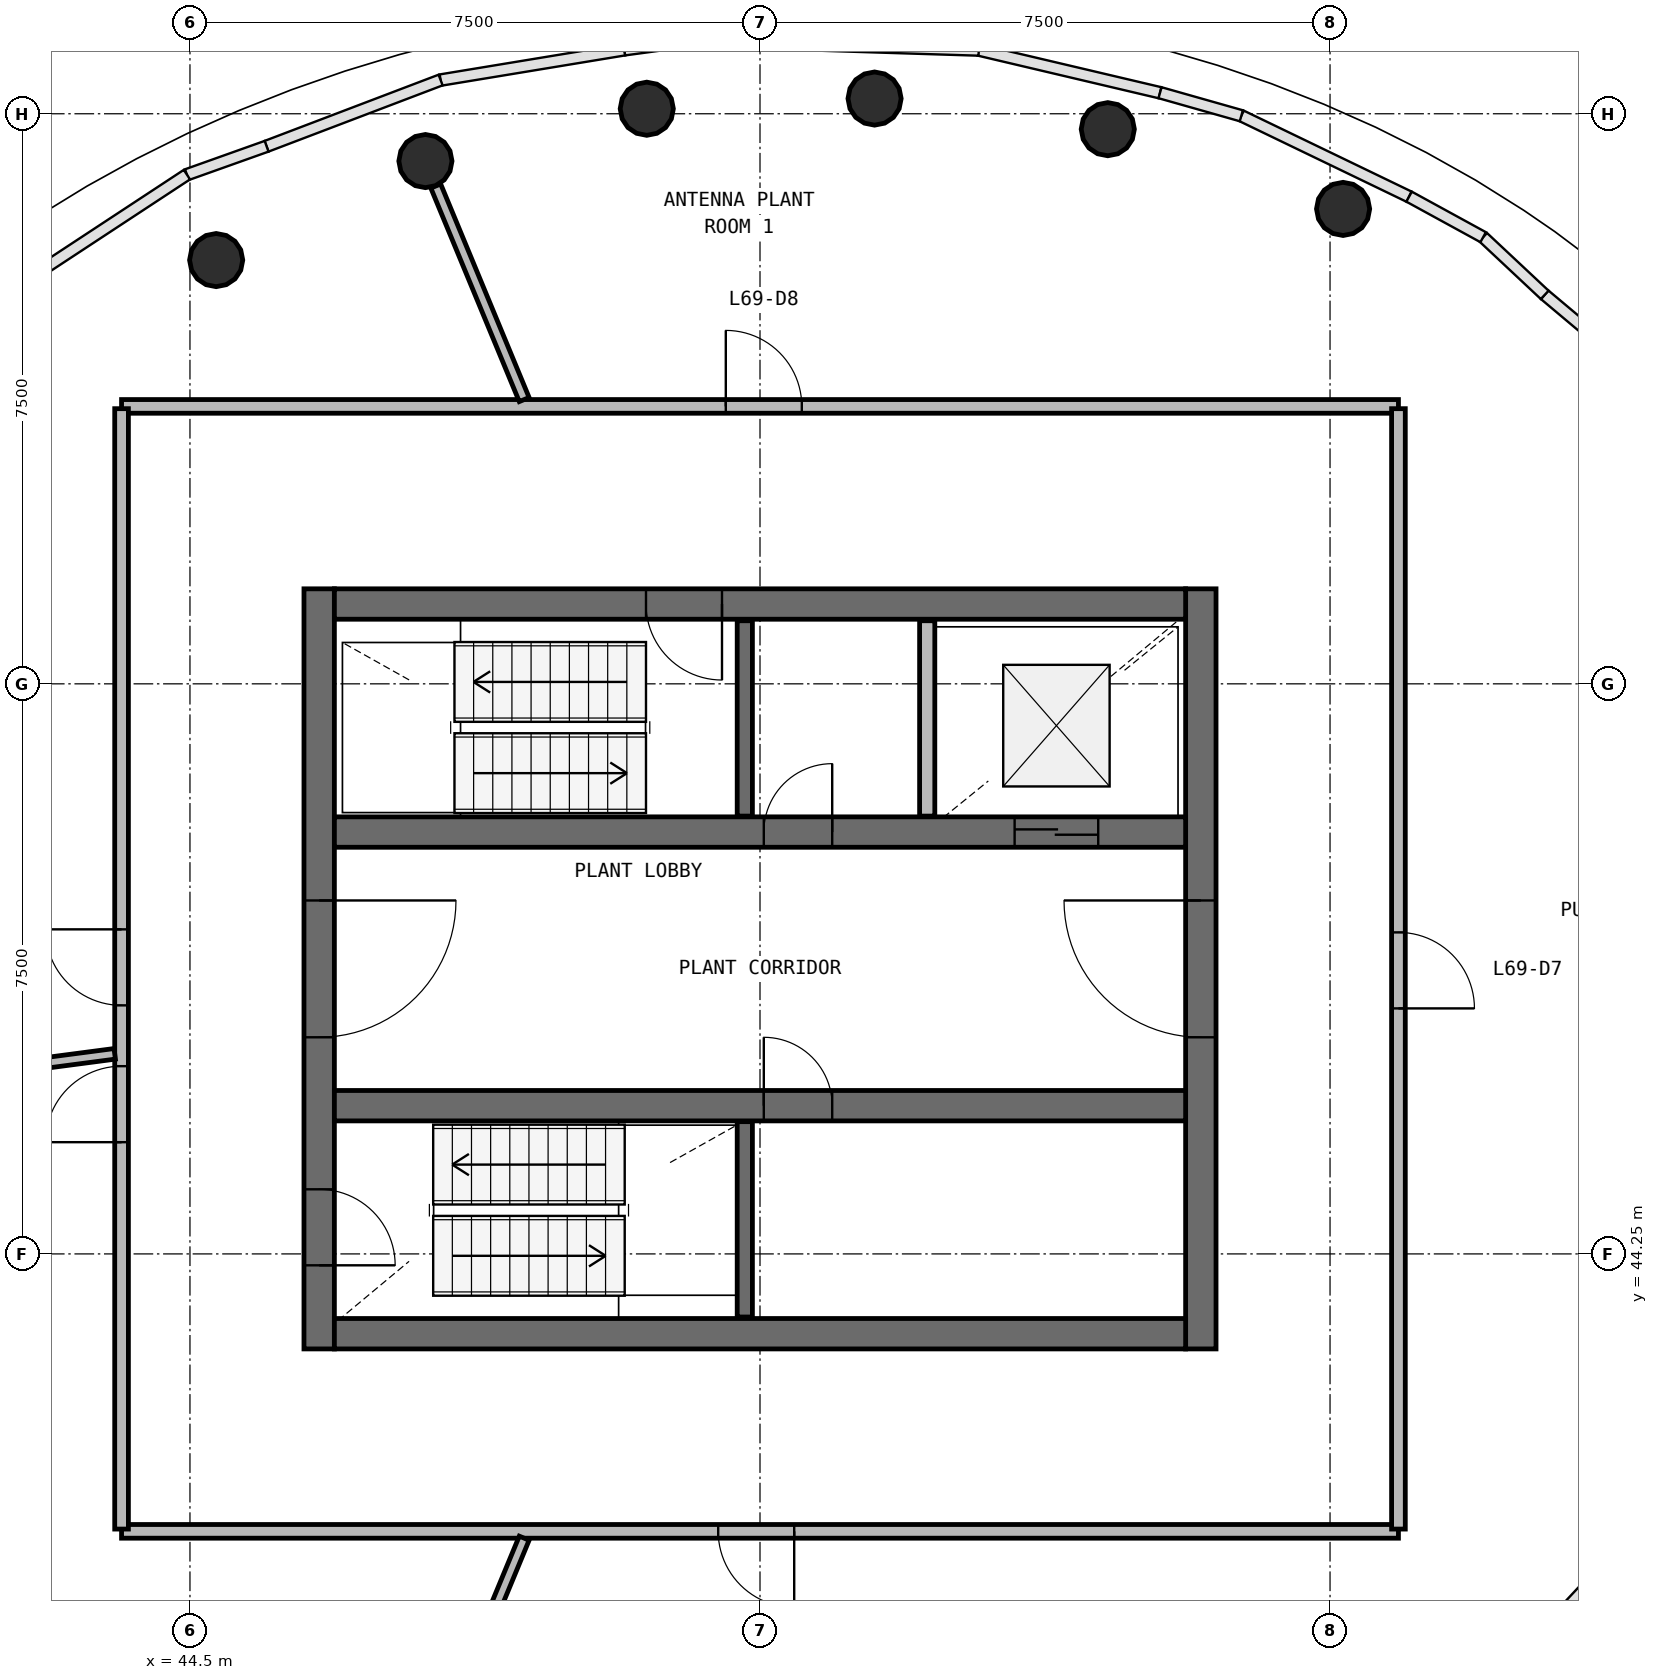
"""IFC4 building model, lengths in metres.
Left out: names, types, materials, properties, quantities, classifications, styles, units other than length and angle.
Written with IfcOpenShell. Run it as: python <this file> out.ifc"""

import sys

from ifc_helpers import new_model, si_unit, direction, frame, frame_2d, origin, origin_2d, place, context, subcontext, project, spatial, rectangle, circle, extrude, source, transform, mapped, element, fill, save


model = new_model("IFC4")
c1 = context("Model", 3, precision=1e-05, world=origin(), true_north=direction((0.0, 1.0)))
c2 = subcontext(c1, "Body", "Model", "MODEL_VIEW")
j1 = project(units=[si_unit("LENGTHUNIT", "METRE"), si_unit("PLANEANGLEUNIT", "RADIAN")], contexts=[c1])
p1 = place(None, origin())
s1 = spatial("IfcSite", under=j1, at=p1, CompositionType="ELEMENT")
p2 = place(p1, origin())
s2 = spatial("IfcBuilding", under=s1, at=p2, CompositionType="ELEMENT")
p3 = place(p2, frame((0.0, 0.0, 280.1)))
s3 = spatial("IfcBuildingStorey", under=s2, at=p3, CompositionType="ELEMENT", Elevation=280.1)
p4 = place(p3, frame((57.8, 43.0, 0.0), z_axis=(0.0, 0.0, 1.0), x_axis=(0.0, 1.0, 0.0)))
e1 = element("IfcWall", 1, at=p4, inside=s3, PredefinedType="SHEAR", context=c2, shape_type="SweptSolid", body=[
    extrude(rectangle(XDim=10.0, YDim=0.4, at=frame_2d((5.0, 0.0))), origin(), (0.0, 0.0, 1.0), 3.5),
])
p5 = place(p4, frame((4.1, 0.0, 0.0)))
e2 = element("IfcOpeningElement", 2, at=p5, cuts=e1, PredefinedType="OPENING", context=c2, shape_type="SweptSolid", body=[
    extrude(rectangle(XDim=1.8, YDim=2.1, at=frame_2d((0.9, 1.05))), frame((0.0, 0.21, 0.0), z_axis=(0.0, -1.0, 0.0), x_axis=(1.0, 0.0, 0.0)), (0.0, 0.0, 1.0), 0.42),
])
p6 = place(p3, frame((46.2, 53.0, 0.0), z_axis=(0.0, 0.0, 1.0), x_axis=(0.0, -1.0, 0.0)))
e3 = element("IfcWall", 3, at=p6, inside=s3, PredefinedType="SHEAR", context=c2, shape_type="SweptSolid", body=[
    extrude(rectangle(XDim=10.0, YDim=0.4, at=frame_2d((5.0, 0.0))), origin(), (0.0, 0.0, 1.0), 3.5),
])
p7 = place(p6, frame((4.1, 0.0, 0.0)))
e4 = element("IfcOpeningElement", 4, at=p7, cuts=e3, PredefinedType="OPENING", context=c2, shape_type="SweptSolid", body=[
    extrude(rectangle(XDim=1.8, YDim=2.1, at=frame_2d((0.9, 1.05))), frame((0.0, 0.21, 0.0), z_axis=(0.0, -1.0, 0.0), x_axis=(1.0, 0.0, 0.0)), (0.0, 0.0, 1.0), 0.42),
])
p8 = place(p6, frame((7.9, 0.0, 0.0)))
e5 = element("IfcOpeningElement", 5, at=p8, cuts=e3, PredefinedType="OPENING", context=c2, shape_type="SweptSolid", body=[
    extrude(rectangle(XDim=1.0, YDim=2.1, at=frame_2d((0.5, 1.05))), frame((0.0, 0.21, 0.0), z_axis=(0.0, -1.0, 0.0), x_axis=(1.0, 0.0, 0.0)), (0.0, 0.0, 1.0), 0.42),
])
p9 = place(p3, frame((46.4, 43.2, 0.0), z_axis=(0.0, 0.0, 1.0), x_axis=(1.0, 0.0, 0.0)))
e6 = element("IfcWall", 6, at=p9, inside=s3, PredefinedType="SHEAR", context=c2, shape_type="SweptSolid", body=[
    extrude(rectangle(XDim=11.2, YDim=0.4, at=frame_2d((5.6, 0.0))), origin(), (0.0, 0.0, 1.0), 3.5),
])
p10 = place(p3, frame((57.6, 52.8, 0.0), z_axis=(0.0, 0.0, 1.0), x_axis=(-1.0, 0.0, 0.0)))
e7 = element("IfcWall", 7, at=p10, inside=s3, PredefinedType="SHEAR", context=c2, shape_type="SweptSolid", body=[
    extrude(rectangle(XDim=11.2, YDim=0.4, at=frame_2d((5.6, 0.0))), origin(), (0.0, 0.0, 1.0), 3.5),
])
p11 = place(p10, frame((6.1, 0.0, 0.0)))
e8 = element("IfcOpeningElement", 8, at=p11, cuts=e7, PredefinedType="OPENING", context=c2, shape_type="SweptSolid", body=[
    extrude(rectangle(XDim=1.0, YDim=2.1, at=frame_2d((0.5, 1.05))), frame((0.0, 0.21, 0.0), z_axis=(0.0, -1.0, 0.0), x_axis=(1.0, 0.0, 0.0)), (0.0, 0.0, 1.0), 0.42),
])
p12 = place(p3, frame((46.4, 49.8, 0.0), z_axis=(0.0, 0.0, 1.0), x_axis=(1.0, 0.0, 0.0)))
e9 = element("IfcWall", 9, at=p12, inside=s3, PredefinedType="SHEAR", context=c2, shape_type="SweptSolid", body=[
    extrude(rectangle(XDim=11.2, YDim=0.4, at=frame_2d((5.6, 0.0))), origin(), (0.0, 0.0, 1.0), 3.5),
])
p13 = place(p12, frame((8.95, 0.0, 0.0)))
e10 = element("IfcOpeningElement", 10, at=p13, cuts=e9, PredefinedType="OPENING", context=c2, shape_type="SweptSolid", body=[
    extrude(rectangle(XDim=1.1, YDim=2.1, at=frame_2d((0.55, 1.05))), frame((0.0, 0.21, 0.0), z_axis=(0.0, -1.0, 0.0), x_axis=(1.0, 0.0, 0.0)), (0.0, 0.0, 1.0), 0.42),
])
p14 = place(p12, frame((5.65, 0.0, 0.0)))
e11 = element("IfcOpeningElement", 11, at=p14, cuts=e9, PredefinedType="OPENING", context=c2, shape_type="SweptSolid", body=[
    extrude(rectangle(XDim=0.9, YDim=2.1, at=frame_2d((0.45, 1.05))), frame((0.0, 0.21, 0.0), z_axis=(0.0, -1.0, 0.0), x_axis=(1.0, 0.0, 0.0)), (0.0, 0.0, 1.0), 0.42),
])
p15 = place(p3, frame((46.4, 46.2, 0.0), z_axis=(0.0, 0.0, 1.0), x_axis=(1.0, 0.0, 0.0)))
e12 = element("IfcWall", 12, at=p15, inside=s3, PredefinedType="SHEAR", context=c2, shape_type="SweptSolid", body=[
    extrude(rectangle(XDim=11.2, YDim=0.4, at=frame_2d((5.6, 0.0))), origin(), (0.0, 0.0, 1.0), 3.5),
])
p16 = place(p15, frame((5.65, 0.0, 0.0)))
e13 = element("IfcOpeningElement", 13, at=p16, cuts=e12, PredefinedType="OPENING", context=c2, shape_type="SweptSolid", body=[
    extrude(rectangle(XDim=0.9, YDim=2.1, at=frame_2d((0.45, 1.05))), frame((0.0, 0.21, 0.0), z_axis=(0.0, -1.0, 0.0), x_axis=(1.0, 0.0, 0.0)), (0.0, 0.0, 1.0), 0.42),
])
m1 = source(origin(), c2, "Body", "SweptSolid", [
    extrude(circle(Radius=0.35, at=origin_2d()), origin(), (0.0, 0.0, 1.0), 4.069),
])
p17 = place(p3, frame((64.965, 53.37, 0.181), z_axis=(-0.471313444732, -0.195280710616, 0.860075043747), x_axis=(0.382777607766, -0.923840518159, 0.0)))
e14 = element("IfcColumn", 14, at=p17, inside=s3, PredefinedType="COLUMN", context=c2, shape_type="MappedRepresentation", body=[
    mapped(m1, transform((0.0, 0.0, 0.0), scale=1.0)),
])
m2 = source(origin(), c2, "Body", "SweptSolid", [
    extrude(circle(Radius=0.35, at=origin_2d()), origin(), (0.0, 0.0, 1.0), 3.908),
])
p18 = place(p3, frame((59.672, 57.998, 0.159), z_axis=(-0.270876761649, -0.352901943394, 0.89559254036), x_axis=(0.793260428126, -0.608882495371, 0.0)))
e15 = element("IfcColumn", 15, at=p18, inside=s3, PredefinedType="COLUMN", context=c2, shape_type="MappedRepresentation", body=[
    mapped(m2, transform((0.0, 0.0, 0.0), scale=1.0)),
])
m3 = source(origin(), c2, "Body", "SweptSolid", [
    extrude(circle(Radius=0.35, at=origin_2d()), origin(), (0.0, 0.0, 1.0), 3.834),
])
p19 = place(p3, frame((56.576, 59.047, 0.146), z_axis=(-0.156087835133, -0.377005297426, 0.912964179712), x_axis=(0.923942661325, -0.382530990356, 0.0)))
e16 = element("IfcColumn", 16, at=p19, inside=s3, PredefinedType="COLUMN", context=c2, shape_type="MappedRepresentation", body=[
    mapped(m3, transform((0.0, 0.0, 0.0), scale=1.0)),
])
m4 = source(origin(), c2, "Body", "SweptSolid", [
    extrude(circle(Radius=0.35, at=origin_2d()), origin(), (0.0, 0.0, 1.0), 3.784),
])
p20 = place(p3, frame((53.507, 59.45, 0.136), z_axis=(-0.049610189762, -0.377076149752, 0.924852640349), x_axis=(0.991456027497, -0.130441349041, 0.0)))
e17 = element("IfcColumn", 17, at=p20, inside=s3, PredefinedType="COLUMN", context=c2, shape_type="MappedRepresentation", body=[
    mapped(m4, transform((0.0, 0.0, 0.0), scale=1.0)),
])
m5 = source(origin(), c2, "Body", "SweptSolid", [
    extrude(circle(Radius=0.35, at=origin_2d()), origin(), (0.0, 0.0, 1.0), 3.759),
])
p21 = place(p3, frame((50.51, 59.316, 0.131), z_axis=(0.047604004307, -0.361803421548, 0.93103820702), x_axis=(0.991454901274, 0.130449908927, 0.0)))
e18 = element("IfcColumn", 18, at=p21, inside=s3, PredefinedType="COLUMN", context=c2, shape_type="MappedRepresentation", body=[
    mapped(m5, transform((0.0, 0.0, 0.0), scale=1.0)),
])
m6 = source(origin(), c2, "Body", "SweptSolid", [
    extrude(circle(Radius=0.35, at=origin_2d()), origin(), (0.0, 0.0, 1.0), 3.747),
])
p22 = place(p3, frame((47.598, 58.628, 0.128), z_axis=(0.136574670104, -0.329773094178, 0.934129041323), x_axis=(0.923901142315, 0.382631257517, 0.0)))
e19 = element("IfcColumn", 19, at=p22, inside=s3, PredefinedType="COLUMN", context=c2, shape_type="MappedRepresentation", body=[
    mapped(m6, transform((0.0, 0.0, 0.0), scale=1.0)),
])
m7 = source(origin(), c2, "Body", "SweptSolid", [
    extrude(circle(Radius=0.35, at=origin_2d()), origin(), (0.0, 0.0, 1.0), 3.739),
])
p23 = place(p3, frame((44.845, 57.325, 0.126), z_axis=(0.213995199353, -0.278905552773, 0.936171857773), x_axis=(0.793376088289, 0.608731782094, 0.0)))
e20 = element("IfcColumn", 20, at=p23, inside=s3, PredefinedType="COLUMN", context=c2, shape_type="MappedRepresentation", body=[
    mapped(m7, transform((0.0, 0.0, 0.0), scale=1.0)),
])
p24 = place(p3, frame((44.328, 38.002, 0.159), z_axis=(0.270876761649, 0.352901943394, 0.89559254036), x_axis=(-0.793260428126, 0.608882495371, 0.0)))
e21 = element("IfcColumn", 21, at=p24, inside=s3, PredefinedType="COLUMN", context=c2, shape_type="MappedRepresentation", body=[
    mapped(m2, transform((0.0, 0.0, 0.0), scale=1.0)),
])
p25 = place(p3, frame((59.155, 38.675, 0.126), z_axis=(-0.213995199353, 0.278905552773, 0.936171857773), x_axis=(-0.793376088289, -0.608731782094, 0.0)))
e22 = element("IfcColumn", 22, at=p25, inside=s3, PredefinedType="COLUMN", context=c2, shape_type="MappedRepresentation", body=[
    mapped(m7, transform((0.0, 0.0, 0.0), scale=1.0)),
])
m8 = source(origin(), c2, "Body", "SweptSolid", [
    extrude(circle(Radius=0.35, at=origin_2d()), origin(), (0.0, 0.0, 1.0), 3.807),
])
p26 = place(p3, frame((63.898, 43.072, 0.141), z_axis=(-0.363645996148, 0.150626775693, 0.919278610613), x_axis=(-0.382682721486, -0.923879826967, 0.0)))
e23 = element("IfcColumn", 23, at=p26, inside=s3, PredefinedType="COLUMN", context=c2, shape_type="MappedRepresentation", body=[
    mapped(m8, transform((0.0, 0.0, 0.0), scale=1.0)),
])
for number, where, z_axis, x_axis in (
    (24, (51.8, 43.42, 0.0), (0.0, 0.0, 1.0), (0.0, 1.0, 0.0)),
    (25, (51.8, 50.01, 0.0), (0.0, 0.0, 1.0), (0.0, 1.0, 0.0)),
    (26, (54.2, 52.58, 0.0), (0.0, 0.0, 1.0), (0.0, -1.0, 0.0)),
):
    element("IfcWall", number, at=place(p3, frame(where, z_axis=z_axis, x_axis=x_axis)), inside=s3, PredefinedType="SOLIDWALL", context=c2, shape_type="SweptSolid", body=[
        extrude(rectangle(XDim=2.57, YDim=0.2, at=frame_2d((1.285, 0.0))), origin(), (0.0, 0.0, 1.0), 3.22),
    ])
p27 = place(p3, frame((43.6, 55.4, 0.0), z_axis=(0.0, 0.0, 1.0), x_axis=(1.0, 0.0, 0.0)))
e27 = element("IfcWall", 27, at=p27, inside=s3, PredefinedType="PARTITIONING", context=c2, shape_type="SweptSolid", body=[
    extrude(rectangle(XDim=16.8, YDim=0.18, at=frame_2d((8.4, 0.0))), origin(), (0.0, 0.0, 1.0), 2.62),
])
p28 = place(p27, frame((7.95, 0.0, 0.0)))
e28 = element("IfcOpeningElement", 28, at=p28, cuts=e27, PredefinedType="OPENING", context=c2, shape_type="SweptSolid", body=[
    extrude(rectangle(XDim=1.0, YDim=2.1, at=frame_2d((0.5, 1.05))), frame((0.0, 0.1, 0.0), z_axis=(0.0, -1.0, 0.0), x_axis=(1.0, 0.0, 0.0)), (0.0, 0.0, 1.0), 0.2),
])
p29 = place(p3, frame((60.4, 40.6, 0.0), z_axis=(0.0, 0.0, 1.0), x_axis=(-1.0, 0.0, 0.0)))
e29 = element("IfcWall", 29, at=p29, inside=s3, PredefinedType="PARTITIONING", context=c2, shape_type="SweptSolid", body=[
    extrude(rectangle(XDim=16.8, YDim=0.18, at=frame_2d((8.4, 0.0))), origin(), (0.0, 0.0, 1.0), 2.62),
])
p30 = place(p29, frame((7.95, 0.0, 0.0)))
e30 = element("IfcOpeningElement", 30, at=p30, cuts=e29, PredefinedType="OPENING", context=c2, shape_type="SweptSolid", body=[
    extrude(rectangle(XDim=1.0, YDim=2.1, at=frame_2d((0.5, 1.05))), frame((0.0, 0.1, 0.0), z_axis=(0.0, -1.0, 0.0), x_axis=(1.0, 0.0, 0.0)), (0.0, 0.0, 1.0), 0.2),
])
p31 = place(p3, frame((60.4, 55.37, 0.0), z_axis=(0.0, 0.0, 1.0), x_axis=(0.0, -1.0, 0.0)))
e31 = element("IfcWall", 31, at=p31, inside=s3, PredefinedType="PARTITIONING", context=c2, shape_type="SweptSolid", body=[
    extrude(rectangle(XDim=14.74, YDim=0.18, at=frame_2d((7.37, 0.0))), origin(), (0.0, 0.0, 1.0), 2.62),
])
p32 = place(p31, frame((6.89, 0.0, 0.0)))
e32 = element("IfcOpeningElement", 32, at=p32, cuts=e31, PredefinedType="OPENING", context=c2, shape_type="SweptSolid", body=[
    extrude(rectangle(XDim=1.0, YDim=2.1, at=frame_2d((0.5, 1.05))), frame((0.0, 0.1, 0.0), z_axis=(0.0, -1.0, 0.0), x_axis=(1.0, 0.0, 0.0)), (0.0, 0.0, 1.0), 0.2),
])
p33 = place(p3, frame((43.6, 40.63, 0.0), z_axis=(0.0, 0.0, 1.0), x_axis=(0.0, 1.0, 0.0)))
e33 = element("IfcWall", 33, at=p33, inside=s3, PredefinedType="PARTITIONING", context=c2, shape_type="SweptSolid", body=[
    extrude(rectangle(XDim=14.74, YDim=0.18, at=frame_2d((7.37, 0.0))), origin(), (0.0, 0.0, 1.0), 2.62),
])
p34 = place(p33, frame((6.89, 0.0, 0.0)))
e34 = element("IfcOpeningElement", 34, at=p34, cuts=e33, PredefinedType="OPENING", context=c2, shape_type="SweptSolid", body=[
    extrude(rectangle(XDim=1.0, YDim=2.1, at=frame_2d((0.5, 1.05))), frame((0.0, 0.1, 0.0), z_axis=(0.0, -1.0, 0.0), x_axis=(1.0, 0.0, 0.0)), (0.0, 0.0, 1.0), 0.2),
])
p35 = place(p33, frame((5.09, 0.0, 0.0)))
e35 = element("IfcOpeningElement", 35, at=p35, cuts=e33, PredefinedType="OPENING", context=c2, shape_type="SweptSolid", body=[
    extrude(rectangle(XDim=1.0, YDim=2.1, at=frame_2d((0.5, 1.05))), frame((0.0, 0.1, 0.0), z_axis=(0.0, -1.0, 0.0), x_axis=(1.0, 0.0, 0.0)), (0.0, 0.0, 1.0), 0.2),
])
p36 = place(p3, frame((43.51, 46.882, 0.0), z_axis=(0.0, 0.0, 1.0), x_axis=(-0.991442831521, -0.130541609556, 0.0)))
e36 = element("IfcWall", 36, at=p36, inside=s3, PredefinedType="PARTITIONING", context=c2, shape_type="SweptSolid", body=[
    extrude(rectangle(XDim=3.48, YDim=0.14, at=frame_2d((1.74, 0.0))), origin(), (0.0, 0.0, 1.0), 2.62),
])
p37 = place(p3, frame((48.897, 40.51, 0.0), z_axis=(0.0, 0.0, 1.0), x_axis=(-0.382691072611, -0.923876367781, 0.0)))
e37 = element("IfcWall", 37, at=p37, inside=s3, PredefinedType="PARTITIONING", context=c2, shape_type="SweptSolid", body=[
    extrude(rectangle(XDim=2.055, YDim=0.14, at=frame_2d((1.027, 0.0))), origin(), (0.0, 0.0, 1.0), 2.62),
])
p38 = place(p3, frame((48.897, 55.49, 0.0), z_axis=(0.0, 0.0, 1.0), x_axis=(-0.382630688808, 0.923901377844, 0.0)))
e38 = element("IfcWall", 38, at=p38, inside=s3, PredefinedType="PARTITIONING", context=c2, shape_type="SweptSolid", body=[
    extrude(rectangle(XDim=3.041, YDim=0.14, at=frame_2d((1.521, 0.0))), origin(), (0.0, 0.0, 1.0), 2.62),
])
m9 = source(origin(), c2, "Body", "SweptSolid", [
    extrude(rectangle(XDim=1.8, YDim=2.1, at=frame_2d((0.9, 1.05))), frame((0.0, 0.025, 0.0), z_axis=(0.0, -1.0, 0.0), x_axis=(1.0, 0.0, 0.0)), (0.0, 0.0, 1.0), 0.05),
])
p39 = place(p7, origin())
e39 = element("IfcDoor", 39, at=p39, inside=s3, OperationType="SINGLE_SWING_LEFT", PredefinedType="DOOR", context=c2, shape_type="MappedRepresentation", body=[
    mapped(m9, transform((0.0, 0.0, 0.0), scale=1.0)),
])
fill(e4, e39)
p40 = place(p5, origin())
e40 = element("IfcDoor", 40, at=p40, inside=s3, OperationType="SINGLE_SWING_RIGHT", PredefinedType="DOOR", context=c2, shape_type="MappedRepresentation", body=[
    mapped(m9, transform((0.0, 0.0, 0.0), scale=1.0)),
])
fill(e2, e40)
m10 = source(origin(), c2, "Body", "SweptSolid", [
    extrude(rectangle(XDim=1.0, YDim=2.1, at=frame_2d((0.5, 1.05))), frame((0.0, 0.025, 0.0), z_axis=(0.0, -1.0, 0.0), x_axis=(1.0, 0.0, 0.0)), (0.0, 0.0, 1.0), 0.05),
])
p41 = place(p11, origin())
e41 = element("IfcDoor", 41, at=p41, inside=s3, OperationType="SINGLE_SWING_LEFT", PredefinedType="DOOR", context=c2, shape_type="MappedRepresentation", body=[
    mapped(m10, transform((0.0, 0.0, 0.0), scale=1.0)),
])
fill(e8, e41)
p42 = place(p8, origin())
e42 = element("IfcDoor", 42, at=p42, inside=s3, OperationType="SINGLE_SWING_RIGHT", PredefinedType="DOOR", context=c2, shape_type="MappedRepresentation", body=[
    mapped(m10, transform((0.0, 0.0, 0.0), scale=1.0)),
])
fill(e5, e42)
m11 = source(origin(), c2, "Body", "SweptSolid", [
    extrude(rectangle(XDim=1.1, YDim=2.1, at=frame_2d((0.55, 1.05))), frame((0.0, 0.025, 0.0), z_axis=(0.0, -1.0, 0.0), x_axis=(1.0, 0.0, 0.0)), (0.0, 0.0, 1.0), 0.05),
])
p43 = place(p13, origin())
e43 = element("IfcDoor", 43, at=p43, inside=s3, OperationType="DOUBLE_DOOR_SLIDING", PredefinedType="USERDEFINED", context=c2, shape_type="MappedRepresentation", body=[
    mapped(m11, transform((0.0, 0.0, 0.0), scale=1.0)),
])
fill(e10, e43)
m12 = source(origin(), c2, "Body", "SweptSolid", [
    extrude(rectangle(XDim=1.0, YDim=2.1, at=frame_2d((0.5, 1.05))), frame((0.0, 0.025, 0.0), z_axis=(0.0, -1.0, 0.0), x_axis=(1.0, 0.0, 0.0)), (0.0, 0.0, 1.0), 0.05),
])
p44 = place(p30, origin())
e44 = element("IfcDoor", 44, at=p44, inside=s3, OperationType="SINGLE_SWING_LEFT", PredefinedType="DOOR", context=c2, shape_type="MappedRepresentation", body=[
    mapped(m12, transform((0.0, 0.0, 0.0), scale=1.0)),
])
fill(e30, e44)
p45 = place(p32, origin())
e45 = element("IfcDoor", 45, at=p45, inside=s3, OperationType="SINGLE_SWING_RIGHT", PredefinedType="DOOR", context=c2, shape_type="MappedRepresentation", body=[
    mapped(m12, transform((0.0, 0.0, 0.0), scale=1.0)),
])
fill(e32, e45)
p46 = place(p28, origin())
e46 = element("IfcDoor", 46, at=p46, inside=s3, OperationType="SINGLE_SWING_LEFT", PredefinedType="DOOR", context=c2, shape_type="MappedRepresentation", body=[
    mapped(m12, transform((0.0, 0.0, 0.0), scale=1.0)),
])
fill(e28, e46)
p47 = place(p34, origin())
e47 = element("IfcDoor", 47, at=p47, inside=s3, OperationType="SINGLE_SWING_RIGHT", PredefinedType="DOOR", context=c2, shape_type="MappedRepresentation", body=[
    mapped(m12, transform((0.0, 0.0, 0.0), scale=1.0)),
])
fill(e34, e47)
p48 = place(p35, origin())
e48 = element("IfcDoor", 48, at=p48, inside=s3, OperationType="SINGLE_SWING_LEFT", PredefinedType="DOOR", context=c2, shape_type="MappedRepresentation", body=[
    mapped(m12, transform((0.0, 0.0, 0.0), scale=1.0)),
])
fill(e35, e48)
m13 = source(origin(), c2, "Body", "SweptSolid", [
    extrude(rectangle(XDim=0.9, YDim=2.1, at=frame_2d((0.45, 1.05))), frame((0.0, 0.025, 0.0), z_axis=(0.0, -1.0, 0.0), x_axis=(1.0, 0.0, 0.0)), (0.0, 0.0, 1.0), 0.05),
])
p49 = place(p14, origin())
e49 = element("IfcDoor", 49, at=p49, inside=s3, OperationType="SINGLE_SWING_RIGHT", PredefinedType="DOOR", context=c2, shape_type="MappedRepresentation", body=[
    mapped(m13, transform((0.0, 0.0, 0.0), scale=1.0)),
])
fill(e11, e49)
p50 = place(p16, origin())
e50 = element("IfcDoor", 50, at=p50, inside=s3, OperationType="SINGLE_SWING_LEFT", PredefinedType="DOOR", context=c2, shape_type="MappedRepresentation", body=[
    mapped(m13, transform((0.0, 0.0, 0.0), scale=1.0)),
])
fill(e13, e50)
save(model, sys.argv[1])
